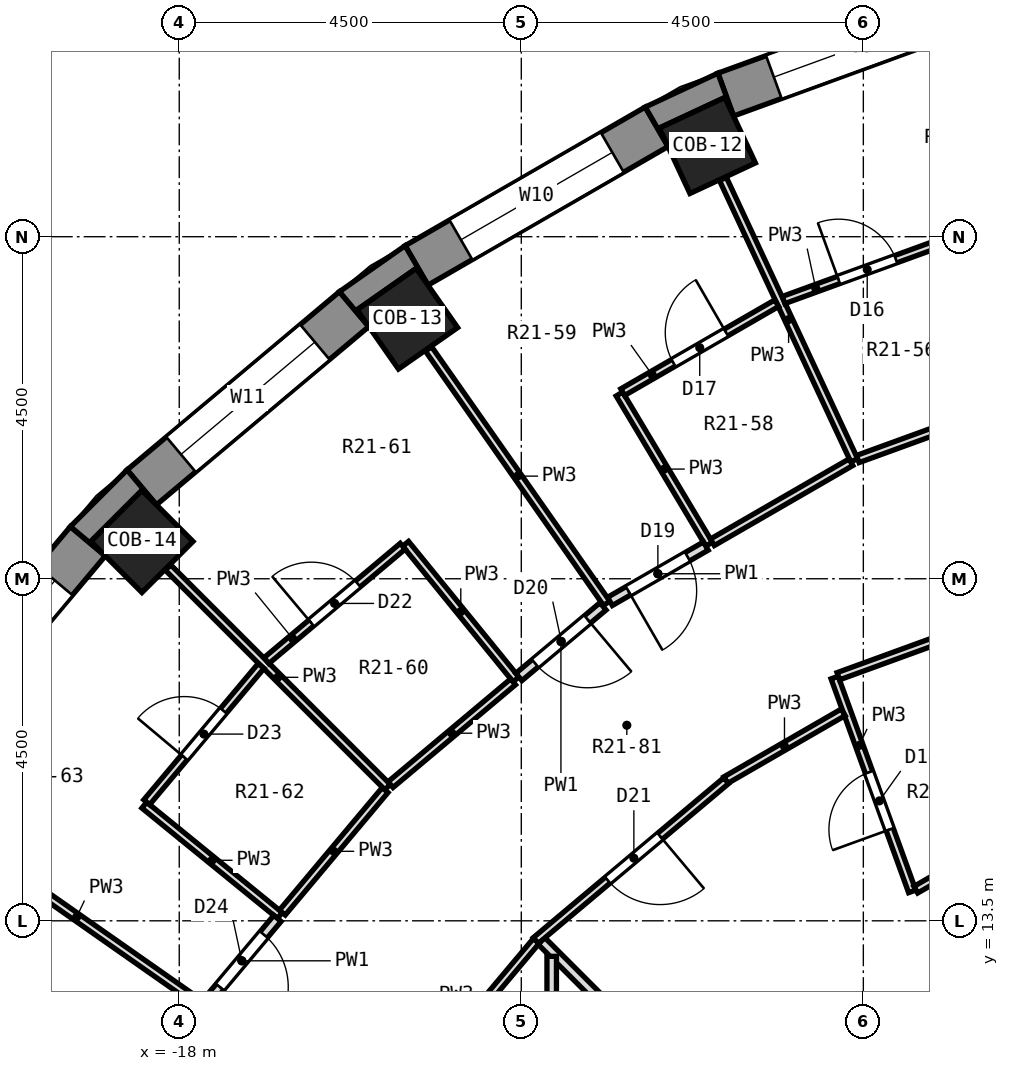
"""IFC4 building model, lengths in metres.
Left out: names, types, materials, properties, quantities, classifications, styles, units other than length and angle.
Written with IfcOpenShell. Run it as: python <this file> out.ifc"""

import sys

from ifc_helpers import new_model, si_unit, direction, frame, frame_2d, origin, origin_2d, place, context, subcontext, project, spatial, polyline, rectangle, outline, extrude, element, fill, save


model = new_model("IFC4")
c1 = context("Model", 3, precision=1e-05, world=origin(), true_north=direction((0.0, 1.0)))
c2 = subcontext(c1, "Body", "Model", "MODEL_VIEW")
j1 = project(units=[si_unit("LENGTHUNIT", "METRE"), si_unit("PLANEANGLEUNIT", "RADIAN")], contexts=[c1])
p1 = place(None, origin())
s1 = spatial("IfcSite", under=j1, at=p1, CompositionType="ELEMENT")
p2 = place(p1, origin())
s2 = spatial("IfcBuilding", under=s1, at=p2, CompositionType="ELEMENT")
p3 = place(p2, frame((0.0, 0.0, 131.5)))
s3 = spatial("IfcBuildingStorey", under=s2, at=p3, CompositionType="ELEMENT", Elevation=131.5)
for number, where, z_axis, x_axis in (
    (1, (-11.052, 23.7, 0.0), (0.0, 0.0, 1.0), (-0.423, 0.906, 0.0)),
    (2, (-14.999, 21.421, 0.0), (0.0, 0.0, 1.0), (-0.574, 0.819, 0.0)),
    (3, (-18.491, 18.491, 0.0), (0.0, 0.0, 1.0), (-0.707, 0.707, 0.0)),
):
    element("IfcColumn", number, at=place(p3, frame(where, z_axis=z_axis, x_axis=x_axis)), inside=s3, PredefinedType="COLUMN", context=c2, shape_type="SweptSolid", body=[
        extrude(rectangle(XDim=0.95, YDim=0.95, at=origin_2d()), origin(), (0.0, 0.0, 1.0), 3.3),
    ])
p4 = place(p3, frame((-7.383, 25.617, 0.0), z_axis=(0.0, 0.0, 1.0), x_axis=(-0.939703505393, -0.341990236633, 0.0)))
e4 = element("IfcWall", 4, at=p4, inside=s3, PredefinedType="SOLIDWALL", context=c2, shape_type="SweptSolid", body=[
    extrude(rectangle(XDim=3.648, YDim=0.6, at=frame_2d((1.824, 0.0))), origin(), (0.0, 0.0, 1.0), 2.8),
])
p5 = place(p4, frame((0.674, 0.0, 0.9)))
e5 = element("IfcOpeningElement", 5, at=p5, cuts=e4, PredefinedType="OPENING", context=c2, shape_type="SweptSolid", body=[
    extrude(rectangle(XDim=2.3, YDim=1.8, at=frame_2d((1.15, 0.9))), frame((0.0, 0.312, 0.0), z_axis=(0.0, -1.0, 0.0), x_axis=(1.0, 0.0, 0.0)), (0.0, 0.0, 1.0), 0.624),
])
p6 = place(p3, frame((-11.719, 23.946, 0.0), z_axis=(0.0, 0.0, 1.0), x_axis=(-0.866051847062, -0.499954196102, 0.0)))
e6 = element("IfcWall", 6, at=p6, inside=s3, PredefinedType="SOLIDWALL", context=c2, shape_type="SweptSolid", body=[
    extrude(rectangle(XDim=3.648, YDim=0.6, at=frame_2d((1.824, 0.0))), origin(), (0.0, 0.0, 1.0), 2.8),
])
p7 = place(p6, frame((0.674, 0.0, 0.9)))
e7 = element("IfcOpeningElement", 7, at=p7, cuts=e6, PredefinedType="OPENING", context=c2, shape_type="SweptSolid", body=[
    extrude(rectangle(XDim=2.3, YDim=1.8, at=frame_2d((1.15, 0.9))), frame((0.0, 0.312, 0.0), z_axis=(0.0, -1.0, 0.0), x_axis=(1.0, 0.0, 0.0)), (0.0, 0.0, 1.0), 0.624),
])
p8 = place(p3, frame((-15.699, 21.547, 0.0), z_axis=(0.0, 0.0, 1.0), x_axis=(-0.766055462616, -0.642774476932, 0.0)))
e8 = element("IfcWall", 8, at=p8, inside=s3, PredefinedType="SOLIDWALL", context=c2, shape_type="SweptSolid", body=[
    extrude(rectangle(XDim=3.648, YDim=0.6, at=frame_2d((1.824, 0.0))), origin(), (0.0, 0.0, 1.0), 2.8),
])
p9 = place(p8, frame((0.674, 0.0, 0.9)))
e9 = element("IfcOpeningElement", 9, at=p9, cuts=e8, PredefinedType="OPENING", context=c2, shape_type="SweptSolid", body=[
    extrude(rectangle(XDim=2.3, YDim=1.8, at=frame_2d((1.15, 0.9))), frame((0.0, 0.312, 0.0), z_axis=(0.0, -1.0, 0.0), x_axis=(1.0, 0.0, 0.0)), (0.0, 0.0, 1.0), 0.624),
])
p10 = place(p3, frame((-19.202, 18.494, 0.0), z_axis=(0.0, 0.0, 1.0), x_axis=(-0.642774476932, -0.766055462616, 0.0)))
e10 = element("IfcWall", 10, at=p10, inside=s3, PredefinedType="SOLIDWALL", context=c2, shape_type="SweptSolid", body=[
    extrude(rectangle(XDim=3.648, YDim=0.6, at=frame_2d((1.824, 0.0))), origin(), (0.0, 0.0, 1.0), 2.8),
])
p11 = place(p10, frame((0.674, 0.0, 0.9)))
e11 = element("IfcOpeningElement", 11, at=p11, cuts=e10, PredefinedType="OPENING", context=c2, shape_type="SweptSolid", body=[
    extrude(rectangle(XDim=2.3, YDim=1.8, at=frame_2d((1.15, 0.9))), frame((0.0, 0.312, 0.0), z_axis=(0.0, -1.0, 0.0), x_axis=(1.0, 0.0, 0.0)), (0.0, 0.0, 1.0), 0.624),
])
p12 = place(p3, origin())
e12 = element("IfcWall", 12, at=p12, inside=s3, PredefinedType="SOLIDWALL", context=c2, shape_type="SweptSolid", body=[
    extrude(outline(polyline([(-10.913, 24.651), (-11.869, 24.206), (-11.569, 23.686), (-11.683, 23.93), (-10.822, 24.331), (-10.708, 24.087), (-10.913, 24.651)])), origin(), (0.0, 0.0, 1.0), 2.8),
])
p13 = place(p3, origin())
e13 = element("IfcWall", 13, at=p13, inside=s3, PredefinedType="SOLIDWALL", context=c2, shape_type="SweptSolid", body=[
    extrude(outline(polyline([(-15.892, 21.777), (-15.506, 21.317), (-15.661, 21.538), (-14.882, 22.083), (-14.728, 21.862), (-15.028, 22.382), (-15.892, 21.777)])), origin(), (0.0, 0.0, 1.0), 2.8),
])
p14 = place(p3, origin())
e14 = element("IfcWall", 14, at=p14, inside=s3, PredefinedType="SOLIDWALL", context=c2, shape_type="SweptSolid", body=[
    extrude(outline(polyline([(-18.686, 19.432), (-19.432, 18.686), (-18.972, 18.301), (-19.163, 18.491), (-18.491, 19.163), (-18.301, 18.972), (-18.686, 19.432)])), origin(), (0.0, 0.0, 1.0), 2.8),
])
p15 = place(p3, frame((-9.378, 16.7, 0.0), z_axis=(0.0, 0.0, 1.0), x_axis=(0.341009323841, -0.940059913545, 0.0)))
e15 = element("IfcWall", 15, at=p15, inside=s3, PredefinedType="PARTITIONING", context=c2, shape_type="SweptSolid", body=[
    extrude(rectangle(XDim=2.993, YDim=0.1, at=frame_2d((1.496, 0.0))), origin(), (0.0, 0.0, 1.0), 2.8),
])
p16 = place(p15, frame((1.326, 0.0, 0.0)))
e16 = element("IfcOpeningElement", 16, at=p16, cuts=e15, PredefinedType="OPENING", context=c2, shape_type="SweptSolid", body=[
    extrude(rectangle(XDim=0.8, YDim=2.1, at=frame_2d((0.4, 1.05))), frame((0.0, 0.062, 0.0), z_axis=(0.0, -1.0, 0.0), x_axis=(1.0, 0.0, 0.0)), (0.0, 0.0, 1.0), 0.124),
])
p17 = place(p3, frame((-10.847, 23.26, 0.0), z_axis=(0.0, 0.0, 1.0), x_axis=(0.422784035137, -0.906230467173, 0.0)))
e17 = element("IfcWall", 17, at=p17, inside=s3, PredefinedType="PARTITIONING", context=c2, shape_type="SweptSolid", body=[
    extrude(rectangle(XDim=4.085, YDim=0.1, at=frame_2d((2.042, 0.0))), origin(), (0.0, 0.0, 1.0), 2.8),
])
p18 = place(p3, frame((-12.209, 20.43, 0.0), z_axis=(0.0, 0.0, 1.0), x_axis=(0.512902991174, -0.858446574718, 0.0)))
e18 = element("IfcWall", 18, at=p18, inside=s3, PredefinedType="PARTITIONING", context=c2, shape_type="SweptSolid", body=[
    extrude(rectangle(XDim=2.301, YDim=0.1, at=frame_2d((1.15, 0.0))), origin(), (0.0, 0.0, 1.0), 2.8),
])
p19 = place(p3, frame((-14.721, 21.024, 0.0), z_axis=(0.0, 0.0, 1.0), x_axis=(0.573638785945, -0.819108383097, 0.0)))
e19 = element("IfcWall", 19, at=p19, inside=s3, PredefinedType="PARTITIONING", context=c2, shape_type="SweptSolid", body=[
    extrude(rectangle(XDim=4.086, YDim=0.1, at=frame_2d((2.043, 0.0))), origin(), (0.0, 0.0, 1.0), 2.8),
])
p20 = place(p3, frame((-15.022, 18.46, 0.0), z_axis=(0.0, 0.0, 1.0), x_axis=(0.6312357633, -0.775591007639, 0.0)))
e20 = element("IfcWall", 20, at=p20, inside=s3, PredefinedType="PARTITIONING", context=c2, shape_type="SweptSolid", body=[
    extrude(rectangle(XDim=2.3, YDim=0.1, at=frame_2d((1.15, 0.0))), origin(), (0.0, 0.0, 1.0), 2.8),
])
p21 = place(p3, frame((-18.148, 18.148, 0.0), z_axis=(0.0, 0.0, 1.0), x_axis=(0.707106781187, -0.707106781187, 0.0)))
e21 = element("IfcWall", 21, at=p21, inside=s3, PredefinedType="PARTITIONING", context=c2, shape_type="SweptSolid", body=[
    extrude(rectangle(XDim=4.085, YDim=0.1, at=frame_2d((2.043, 0.0))), origin(), (0.0, 0.0, 1.0), 2.8),
])
p22 = place(p3, frame((-13.237, 13.237, 0.0), z_axis=(0.0, 0.0, 1.0), x_axis=(0.707106781187, -0.707106781187, 0.0)))
e22 = element("IfcWall", 22, at=p22, inside=s3, PredefinedType="PARTITIONING", context=c2, shape_type="SweptSolid", body=[
    extrude(rectangle(XDim=7.615, YDim=0.125, at=frame_2d((3.807, 0.0))), origin(), (0.0, 0.0, 1.0), 2.8),
])
p23 = place(p3, frame((-18.46, 15.022, 0.0), z_axis=(0.0, 0.0, 1.0), x_axis=(0.775591007639, -0.6312357633, 0.0)))
e23 = element("IfcWall", 23, at=p23, inside=s3, PredefinedType="PARTITIONING", context=c2, shape_type="SweptSolid", body=[
    extrude(rectangle(XDim=2.3, YDim=0.1, at=frame_2d((1.15, 0.0))), origin(), (0.0, 0.0, 1.0), 2.8),
])
p24 = place(p3, frame((-21.024, 14.721, 0.0), z_axis=(0.0, 0.0, 1.0), x_axis=(0.819108383097, -0.573638785945, 0.0)))
e24 = element("IfcWall", 24, at=p24, inside=s3, PredefinedType="PARTITIONING", context=c2, shape_type="SweptSolid", body=[
    extrude(rectangle(XDim=4.086, YDim=0.1, at=frame_2d((2.043, 0.0))), origin(), (0.0, 0.0, 1.0), 2.8),
])
p25 = place(p3, frame((-9.329, 16.718, 0.0), z_axis=(0.0, 0.0, 1.0), x_axis=(0.939665632091, 0.342094285054, 0.0)))
e25 = element("IfcWall", 25, at=p25, inside=s3, PredefinedType="PARTITIONING", context=c2, shape_type="SweptSolid", body=[
    extrude(rectangle(XDim=1.395, YDim=0.1, at=frame_2d((0.698, 0.0))), origin(), (0.0, 0.0, 1.0), 2.8),
])
p26 = place(p3, frame((-9.073, 19.575, 0.0), z_axis=(0.0, 0.0, 1.0), x_axis=(0.939728749343, 0.341920864613, 0.0)))
e26 = element("IfcWall", 26, at=p26, inside=s3, PredefinedType="PARTITIONING", context=c2, shape_type="SweptSolid", body=[
    extrude(rectangle(XDim=2.205, YDim=0.1, at=frame_2d((1.103, 0.0))), origin(), (0.0, 0.0, 1.0), 2.8),
])
p27 = place(p3, frame((-10.049, 21.667, 0.0), z_axis=(0.0, 0.0, 1.0), x_axis=(0.939662448837, 0.342103028699, 0.0)))
e27 = element("IfcWall", 27, at=p27, inside=s3, PredefinedType="PARTITIONING", context=c2, shape_type="SweptSolid", body=[
    extrude(rectangle(XDim=2.342, YDim=0.1, at=frame_2d((1.171, 0.0))), origin(), (0.0, 0.0, 1.0), 2.8),
])
p28 = place(p27, frame((0.771, 0.0, 0.0)))
e28 = element("IfcOpeningElement", 28, at=p28, cuts=e27, PredefinedType="OPENING", context=c2, shape_type="SweptSolid", body=[
    extrude(rectangle(XDim=0.8, YDim=2.1, at=frame_2d((0.4, 1.05))), frame((0.0, 0.062, 0.0), z_axis=(0.0, -1.0, 0.0), x_axis=(1.0, 0.0, 0.0)), (0.0, 0.0, 1.0), 0.124),
])
p29 = place(p3, frame((-8.31, 13.909, 0.0), z_axis=(0.0, 0.0, 1.0), x_axis=(0.866137275136, 0.499806183056, 0.0)))
e29 = element("IfcWall", 29, at=p29, inside=s3, PredefinedType="PARTITIONING", context=c2, shape_type="SweptSolid", body=[
    extrude(rectangle(XDim=2.019, YDim=0.1, at=frame_2d((1.01, 0.0))), origin(), (0.0, 0.0, 1.0), 2.8),
])
p30 = place(p3, frame((-10.81, 15.351, 0.0), z_axis=(0.0, 0.0, 1.0), x_axis=(0.866037519928, 0.499979013637, 0.0)))
e30 = element("IfcWall", 30, at=p30, inside=s3, PredefinedType="PARTITIONING", context=c2, shape_type="SweptSolid", body=[
    extrude(rectangle(XDim=1.785, YDim=0.1, at=frame_2d((0.892, 0.0))), origin(), (0.0, 0.0, 1.0), 2.8),
])
p31 = place(p3, frame((-10.986, 18.48, 0.0), z_axis=(0.0, 0.0, 1.0), x_axis=(0.865841622723, 0.50031818312, 0.0)))
e31 = element("IfcWall", 31, at=p31, inside=s3, PredefinedType="PARTITIONING", context=c2, shape_type="SweptSolid", body=[
    extrude(rectangle(XDim=2.105, YDim=0.1, at=frame_2d((1.052, 0.0))), origin(), (0.0, 0.0, 1.0), 2.8),
])
p32 = place(p3, frame((-12.334, 17.702, 0.0), z_axis=(0.0, 0.0, 1.0), x_axis=(0.866110229381, 0.499853048967, 0.0)))
e32 = element("IfcWall", 32, at=p32, inside=s3, PredefinedType="PARTITIONING", context=c2, shape_type="SweptSolid", body=[
    extrude(rectangle(XDim=1.457, YDim=0.125, at=frame_2d((0.728, 0.0))), origin(), (0.0, 0.0, 1.0), 2.8),
])
p33 = place(p32, frame((0.278, 0.0, 0.0)))
e33 = element("IfcOpeningElement", 33, at=p33, cuts=e32, PredefinedType="OPENING", context=c2, shape_type="SweptSolid", body=[
    extrude(rectangle(XDim=0.9, YDim=2.1, at=frame_2d((0.45, 1.05))), frame((0.0, 0.074, 0.0), z_axis=(0.0, -1.0, 0.0), x_axis=(1.0, 0.0, 0.0)), (0.0, 0.0, 1.0), 0.149),
])
p34 = place(p3, frame((-12.166, 20.455, 0.0), z_axis=(0.0, 0.0, 1.0), x_axis=(0.866025730634, 0.499999433879, 0.0)))
e34 = element("IfcWall", 34, at=p34, inside=s3, PredefinedType="PARTITIONING", context=c2, shape_type="SweptSolid", body=[
    extrude(rectangle(XDim=2.34, YDim=0.1, at=frame_2d((1.17, 0.0))), origin(), (0.0, 0.0, 1.0), 2.8),
])
p35 = place(p34, frame((0.77, 0.0, 0.0)))
e35 = element("IfcOpeningElement", 35, at=p35, cuts=e34, PredefinedType="OPENING", context=c2, shape_type="SweptSolid", body=[
    extrude(rectangle(XDim=0.8, YDim=2.1, at=frame_2d((0.4, 1.05))), frame((0.0, 0.062, 0.0), z_axis=(0.0, -1.0, 0.0), x_axis=(1.0, 0.0, 0.0)), (0.0, 0.0, 1.0), 0.124),
])
p36 = place(p3, frame((-13.311, 13.239, 0.0), z_axis=(0.0, 0.0, 1.0), x_axis=(0.76586207823, 0.643004881109, 0.0)))
e36 = element("IfcWall", 36, at=p36, inside=s3, PredefinedType="PARTITIONING", context=c2, shape_type="SweptSolid", body=[
    extrude(rectangle(XDim=3.273, YDim=0.1, at=frame_2d((1.636, 0.0))), origin(), (0.0, 0.0, 1.0), 2.8),
])
p37 = place(p36, frame((1.237, 0.0, 0.0)))
e37 = element("IfcOpeningElement", 37, at=p37, cuts=e36, PredefinedType="OPENING", context=c2, shape_type="SweptSolid", body=[
    extrude(rectangle(XDim=0.9, YDim=2.1, at=frame_2d((0.45, 1.05))), frame((0.0, 0.062, 0.0), z_axis=(0.0, -1.0, 0.0), x_axis=(1.0, 0.0, 0.0)), (0.0, 0.0, 1.0), 0.124),
])
p38 = place(p3, frame((-15.22, 15.292, 0.0), z_axis=(0.0, 0.0, 1.0), x_axis=(0.766104886508, 0.642715569181, 0.0)))
e38 = element("IfcWall", 38, at=p38, inside=s3, PredefinedType="PARTITIONING", context=c2, shape_type="SweptSolid", body=[
    extrude(rectangle(XDim=2.103, YDim=0.1, at=frame_2d((1.052, 0.0))), origin(), (0.0, 0.0, 1.0), 2.8),
])
p39 = place(p3, frame((-13.532, 16.708, 0.0), z_axis=(0.0, 0.0, 1.0), x_axis=(0.766167387458, 0.642641061866, 0.0)))
e39 = element("IfcWall", 39, at=p39, inside=s3, PredefinedType="PARTITIONING", context=c2, shape_type="SweptSolid", body=[
    extrude(rectangle(XDim=1.445, YDim=0.125, at=frame_2d((0.722, 0.0))), origin(), (0.0, 0.0, 1.0), 2.8),
])
p40 = place(p39, frame((0.279, 0.0, 0.0)))
e40 = element("IfcOpeningElement", 40, at=p40, cuts=e39, PredefinedType="OPENING", context=c2, shape_type="SweptSolid", body=[
    extrude(rectangle(XDim=0.9, YDim=2.1, at=frame_2d((0.45, 1.05))), frame((0.0, 0.074, 0.0), z_axis=(0.0, -1.0, 0.0), x_axis=(1.0, 0.0, 0.0)), (0.0, 0.0, 1.0), 0.149),
])
p41 = place(p3, frame((-16.853, 16.923, 0.0), z_axis=(0.0, 0.0, 1.0), x_axis=(0.765924716163, 0.642930267735, 0.0)))
e41 = element("IfcWall", 41, at=p41, inside=s3, PredefinedType="PARTITIONING", context=c2, shape_type="SweptSolid", body=[
    extrude(rectangle(XDim=2.34, YDim=0.1, at=frame_2d((1.17, 0.0))), origin(), (0.0, 0.0, 1.0), 2.8),
])
p42 = place(p41, frame((0.77, 0.0, 0.0)))
e42 = element("IfcOpeningElement", 42, at=p42, cuts=e41, PredefinedType="OPENING", context=c2, shape_type="SweptSolid", body=[
    extrude(rectangle(XDim=0.8, YDim=2.1, at=frame_2d((0.4, 1.05))), frame((0.0, 0.062, 0.0), z_axis=(0.0, -1.0, 0.0), x_axis=(1.0, 0.0, 0.0)), (0.0, 0.0, 1.0), 0.124),
])
p43 = place(p3, frame((-15.409, 10.727, 0.0), z_axis=(0.0, 0.0, 1.0), x_axis=(0.643004881109, 0.76586207823, 0.0)))
e43 = element("IfcWall", 43, at=p43, inside=s3, PredefinedType="PARTITIONING", context=c2, shape_type="SweptSolid", body=[
    extrude(rectangle(XDim=3.273, YDim=0.1, at=frame_2d((1.636, 0.0))), origin(), (0.0, 0.0, 1.0), 2.8),
])
p44 = place(p3, frame((-16.644, 13.608, 0.0), z_axis=(0.0, 0.0, 1.0), x_axis=(0.642715569181, 0.766104886508, 0.0)))
e44 = element("IfcWall", 44, at=p44, inside=s3, PredefinedType="PARTITIONING", context=c2, shape_type="SweptSolid", body=[
    extrude(rectangle(XDim=2.103, YDim=0.1, at=frame_2d((1.052, 0.0))), origin(), (0.0, 0.0, 1.0), 2.8),
])
p45 = place(p3, frame((-17.645, 12.415, 0.0), z_axis=(0.0, 0.0, 1.0), x_axis=(0.642669367872, 0.766143644233, 0.0)))
e45 = element("IfcWall", 45, at=p45, inside=s3, PredefinedType="PARTITIONING", context=c2, shape_type="SweptSolid", body=[
    extrude(rectangle(XDim=1.457, YDim=0.125, at=frame_2d((0.729, 0.0))), origin(), (0.0, 0.0, 1.0), 2.8),
])
p46 = place(p45, frame((0.279, 0.0, 0.0)))
e46 = element("IfcOpeningElement", 46, at=p46, cuts=e45, PredefinedType="OPENING", context=c2, shape_type="SweptSolid", body=[
    extrude(rectangle(XDim=0.9, YDim=2.1, at=frame_2d((0.45, 1.05))), frame((0.0, 0.074, 0.0), z_axis=(0.0, -1.0, 0.0), x_axis=(1.0, 0.0, 0.0)), (0.0, 0.0, 1.0), 0.149),
])
p47 = place(p3, frame((-18.428, 15.06, 0.0), z_axis=(0.0, 0.0, 1.0), x_axis=(0.642930267735, 0.765924716163, 0.0)))
e47 = element("IfcWall", 47, at=p47, inside=s3, PredefinedType="PARTITIONING", context=c2, shape_type="SweptSolid", body=[
    extrude(rectangle(XDim=2.34, YDim=0.1, at=frame_2d((1.17, 0.0))), origin(), (0.0, 0.0, 1.0), 2.8),
])
p48 = place(p47, frame((0.77, 0.0, 0.0)))
e48 = element("IfcOpeningElement", 48, at=p48, cuts=e47, PredefinedType="OPENING", context=c2, shape_type="SweptSolid", body=[
    extrude(rectangle(XDim=0.8, YDim=2.1, at=frame_2d((0.4, 1.05))), frame((0.0, 0.062, 0.0), z_axis=(0.0, -1.0, 0.0), x_axis=(1.0, 0.0, 0.0)), (0.0, 0.0, 1.0), 0.124),
])
p49 = place(p3, frame((-13.1, 9.76, 0.0), z_axis=(0.0, 0.0, 1.0), x_axis=(0.0, 1.0, 0.0)))
e49 = element("IfcWall", 49, at=p49, inside=s3, PredefinedType="PARTITIONING", context=c2, shape_type="SweptSolid", body=[
    extrude(rectangle(XDim=3.272, YDim=0.125, at=frame_2d((1.636, 0.0))), origin(), (0.0, 0.0, 1.0), 2.8),
])
p50 = place(p5, origin())
e50 = element("IfcWindow", 50, at=p50, inside=s3, PartitioningType="SINGLE_PANEL", PredefinedType="WINDOW", context=c2, shape_type="SweptSolid", body=[
    extrude(rectangle(XDim=2.3, YDim=1.8, at=frame_2d((1.15, 0.9))), frame((0.0, 0.18, 0.0), z_axis=(0.0, -1.0, 0.0), x_axis=(1.0, 0.0, 0.0)), (0.0, 0.0, 1.0), 0.06),
])
fill(e5, e50)
p51 = place(p7, origin())
e51 = element("IfcWindow", 51, at=p51, inside=s3, PartitioningType="SINGLE_PANEL", PredefinedType="WINDOW", context=c2, shape_type="SweptSolid", body=[
    extrude(rectangle(XDim=2.3, YDim=1.8, at=frame_2d((1.15, 0.9))), frame((0.0, 0.18, 0.0), z_axis=(0.0, -1.0, 0.0), x_axis=(1.0, 0.0, 0.0)), (0.0, 0.0, 1.0), 0.06),
])
fill(e7, e51)
p52 = place(p9, origin())
e52 = element("IfcWindow", 52, at=p52, inside=s3, PartitioningType="SINGLE_PANEL", PredefinedType="WINDOW", context=c2, shape_type="SweptSolid", body=[
    extrude(rectangle(XDim=2.3, YDim=1.8, at=frame_2d((1.15, 0.9))), frame((0.0, 0.18, 0.0), z_axis=(0.0, -1.0, 0.0), x_axis=(1.0, 0.0, 0.0)), (0.0, 0.0, 1.0), 0.06),
])
fill(e9, e52)
p53 = place(p11, origin())
e53 = element("IfcWindow", 53, at=p53, inside=s3, PartitioningType="SINGLE_PANEL", PredefinedType="WINDOW", context=c2, shape_type="SweptSolid", body=[
    extrude(rectangle(XDim=2.3, YDim=1.8, at=frame_2d((1.15, 0.9))), frame((0.0, 0.18, 0.0), z_axis=(0.0, -1.0, 0.0), x_axis=(1.0, 0.0, 0.0)), (0.0, 0.0, 1.0), 0.06),
])
fill(e11, e53)
p54 = place(p28, origin())
e54 = element("IfcDoor", 54, at=p54, inside=s3, OperationType="SINGLE_SWING_LEFT", PredefinedType="DOOR", context=c2, shape_type="SweptSolid", body=[
    extrude(rectangle(XDim=0.8, YDim=2.1, at=frame_2d((0.4, 1.05))), frame((0.0, 0.025, 0.0), z_axis=(0.0, -1.0, 0.0), x_axis=(1.0, 0.0, 0.0)), (0.0, 0.0, 1.0), 0.05),
])
fill(e28, e54)
p55 = place(p35, origin())
e55 = element("IfcDoor", 55, at=p55, inside=s3, OperationType="SINGLE_SWING_RIGHT", PredefinedType="DOOR", context=c2, shape_type="SweptSolid", body=[
    extrude(rectangle(XDim=0.8, YDim=2.1, at=frame_2d((0.4, 1.05))), frame((0.0, 0.025, 0.0), z_axis=(0.0, -1.0, 0.0), x_axis=(1.0, 0.0, 0.0)), (0.0, 0.0, 1.0), 0.05),
])
fill(e35, e55)
p56 = place(p16, frame((0.8, 0.0, 0.0), z_axis=(0.0, 0.0, 1.0), x_axis=(-1.0, 0.0, 0.0)))
e56 = element("IfcDoor", 56, at=p56, inside=s3, OperationType="SINGLE_SWING_LEFT", PredefinedType="DOOR", context=c2, shape_type="SweptSolid", body=[
    extrude(rectangle(XDim=0.8, YDim=2.1, at=frame_2d((0.4, 1.05))), frame((0.0, 0.025, 0.0), z_axis=(0.0, -1.0, 0.0), x_axis=(1.0, 0.0, 0.0)), (0.0, 0.0, 1.0), 0.05),
])
fill(e16, e56)
p57 = place(p33, frame((0.9, 0.0, 0.0), z_axis=(0.0, 0.0, 1.0), x_axis=(-1.0, 0.0, 0.0)))
e57 = element("IfcDoor", 57, at=p57, inside=s3, OperationType="SINGLE_SWING_RIGHT", PredefinedType="DOOR", context=c2, shape_type="SweptSolid", body=[
    extrude(rectangle(XDim=0.9, YDim=2.1, at=frame_2d((0.45, 1.05))), frame((0.0, 0.025, 0.0), z_axis=(0.0, -1.0, 0.0), x_axis=(1.0, 0.0, 0.0)), (0.0, 0.0, 1.0), 0.05),
])
fill(e33, e57)
p58 = place(p40, frame((0.9, 0.0, 0.0), z_axis=(0.0, 0.0, 1.0), x_axis=(-1.0, 0.0, 0.0)))
e58 = element("IfcDoor", 58, at=p58, inside=s3, OperationType="SINGLE_SWING_LEFT", PredefinedType="DOOR", context=c2, shape_type="SweptSolid", body=[
    extrude(rectangle(XDim=0.9, YDim=2.1, at=frame_2d((0.45, 1.05))), frame((0.0, 0.025, 0.0), z_axis=(0.0, -1.0, 0.0), x_axis=(1.0, 0.0, 0.0)), (0.0, 0.0, 1.0), 0.05),
])
fill(e40, e58)
p59 = place(p37, frame((0.9, 0.0, 0.0), z_axis=(0.0, 0.0, 1.0), x_axis=(-1.0, 0.0, 0.0)))
e59 = element("IfcDoor", 59, at=p59, inside=s3, OperationType="SINGLE_SWING_LEFT", PredefinedType="DOOR", context=c2, shape_type="SweptSolid", body=[
    extrude(rectangle(XDim=0.9, YDim=2.1, at=frame_2d((0.45, 1.05))), frame((0.0, 0.025, 0.0), z_axis=(0.0, -1.0, 0.0), x_axis=(1.0, 0.0, 0.0)), (0.0, 0.0, 1.0), 0.05),
])
fill(e37, e59)
p60 = place(p42, origin())
e60 = element("IfcDoor", 60, at=p60, inside=s3, OperationType="SINGLE_SWING_LEFT", PredefinedType="DOOR", context=c2, shape_type="SweptSolid", body=[
    extrude(rectangle(XDim=0.8, YDim=2.1, at=frame_2d((0.4, 1.05))), frame((0.0, 0.025, 0.0), z_axis=(0.0, -1.0, 0.0), x_axis=(1.0, 0.0, 0.0)), (0.0, 0.0, 1.0), 0.05),
])
fill(e42, e60)
p61 = place(p48, origin())
e61 = element("IfcDoor", 61, at=p61, inside=s3, OperationType="SINGLE_SWING_LEFT", PredefinedType="DOOR", context=c2, shape_type="SweptSolid", body=[
    extrude(rectangle(XDim=0.8, YDim=2.1, at=frame_2d((0.4, 1.05))), frame((0.0, 0.025, 0.0), z_axis=(0.0, -1.0, 0.0), x_axis=(1.0, 0.0, 0.0)), (0.0, 0.0, 1.0), 0.05),
])
fill(e48, e61)
p62 = place(p46, frame((0.9, 0.0, 0.0), z_axis=(0.0, 0.0, 1.0), x_axis=(-1.0, 0.0, 0.0)))
e62 = element("IfcDoor", 62, at=p62, inside=s3, OperationType="SINGLE_SWING_RIGHT", PredefinedType="DOOR", context=c2, shape_type="SweptSolid", body=[
    extrude(rectangle(XDim=0.9, YDim=2.1, at=frame_2d((0.45, 1.05))), frame((0.0, 0.025, 0.0), z_axis=(0.0, -1.0, 0.0), x_axis=(1.0, 0.0, 0.0)), (0.0, 0.0, 1.0), 0.05),
])
fill(e46, e62)
save(model, sys.argv[1])
